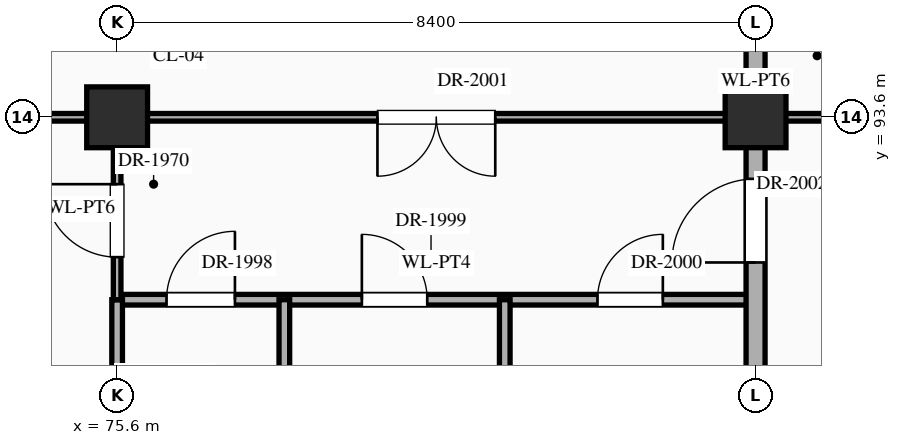
"""IFC4 building model, lengths in metres.
Left out: names, types, materials, properties, quantities, classifications, styles, units other than length and angle.
Written with IfcOpenShell. Run it as: python <this file> out.ifc"""

import sys

from ifc_helpers import new_model, si_unit, direction, frame, frame_2d, origin, origin_2d, place, context, subcontext, project, spatial, rectangle, extrude, element, fill, save


model = new_model("IFC4")
c1 = context("Model", 3, precision=1e-05, world=origin(), true_north=direction((0.0, 1.0)))
c2 = subcontext(c1, "Body", "Model", "MODEL_VIEW")
j1 = project(units=[si_unit("LENGTHUNIT", "METRE"), si_unit("PLANEANGLEUNIT", "RADIAN")], contexts=[c1])
p1 = place(None, origin())
s1 = spatial("IfcSite", under=j1, at=p1, CompositionType="ELEMENT")
p2 = place(p1, origin())
s2 = spatial("IfcBuilding", under=s1, at=p2, CompositionType="ELEMENT")
p3 = place(p2, frame((0.0, 0.0, 21.6)))
s3 = spatial("IfcBuildingStorey", under=s2, at=p3, CompositionType="ELEMENT", Elevation=21.6)
for number, where, z_axis, x_axis in (
    (1, (75.6, 93.6, 0.0), (0.0, 0.0, 1.0), (1.0, 0.0, 0.0)),
    (2, (84.0, 93.6, 0.0), (0.0, 0.0, 1.0), (1.0, 0.0, 0.0)),
):
    element("IfcColumn", number, at=place(p3, frame(where, z_axis=z_axis, x_axis=x_axis)), inside=s3, PredefinedType="COLUMN", context=c2, shape_type="SweptSolid", body=[
        extrude(rectangle(XDim=0.8, YDim=0.8, at=origin_2d()), origin(), (0.0, 0.0, 1.0), 4.5),
    ])
p4 = place(p3, frame((75.6, 91.2, 0.0), z_axis=(0.0, 0.0, 1.0), x_axis=(1.0, 0.0, 0.0)))
e3 = element("IfcWall", 3, at=p4, inside=s3, PredefinedType="STANDARD", context=c2, shape_type="SweptSolid", body=[
    extrude(rectangle(XDim=8.4, YDim=0.14, at=frame_2d((4.2, 0.0))), origin(), (0.0, 0.0, 1.0), 4.24),
])
p5 = place(p4, frame((0.65, 0.0, 0.0)))
e4 = element("IfcOpeningElement", 4, at=p5, cuts=e3, PredefinedType="OPENING", context=c2, shape_type="SweptSolid", body=[
    extrude(rectangle(XDim=0.9, YDim=2.15, at=frame_2d((0.45, 1.075))), frame((0.0, 0.082, 0.0), z_axis=(0.0, -1.0, 0.0), x_axis=(1.0, 0.0, 0.0)), (0.0, 0.0, 1.0), 0.164),
])
p6 = place(p4, frame((3.22, 0.0, 0.0)))
e5 = element("IfcOpeningElement", 5, at=p6, cuts=e3, PredefinedType="OPENING", context=c2, shape_type="SweptSolid", body=[
    extrude(rectangle(XDim=0.86, YDim=2.1, at=frame_2d((0.43, 1.05))), frame((0.0, 0.082, 0.0), z_axis=(0.0, -1.0, 0.0), x_axis=(1.0, 0.0, 0.0)), (0.0, 0.0, 1.0), 0.164),
])
p7 = place(p4, frame((6.32, 0.0, 0.0)))
e6 = element("IfcOpeningElement", 6, at=p7, cuts=e3, PredefinedType="OPENING", context=c2, shape_type="SweptSolid", body=[
    extrude(rectangle(XDim=0.86, YDim=2.1, at=frame_2d((0.43, 1.05))), frame((0.0, 0.082, 0.0), z_axis=(0.0, -1.0, 0.0), x_axis=(1.0, 0.0, 0.0)), (0.0, 0.0, 1.0), 0.164),
])
p8 = place(p3, frame((67.2, 93.6, 0.0), z_axis=(0.0, 0.0, 1.0), x_axis=(1.0, 0.0, 0.0)))
e7 = element("IfcWall", 7, at=p8, inside=s3, PredefinedType="STANDARD", context=c2, shape_type="SweptSolid", body=[
    extrude(rectangle(XDim=33.6, YDim=0.1, at=frame_2d((16.8, 0.0))), origin(), (0.0, 0.0, 1.0), 3.39),
])
p9 = place(p8, frame((3.425, 0.0, 0.0)))
e8 = element("IfcOpeningElement", 8, at=p9, cuts=e7, PredefinedType="OPENING", context=c2, shape_type="SweptSolid", body=[
    extrude(rectangle(XDim=1.55, YDim=2.35, at=frame_2d((0.775, 1.175))), frame((0.0, 0.062, 0.0), z_axis=(0.0, -1.0, 0.0), x_axis=(1.0, 0.0, 0.0)), (0.0, 0.0, 1.0), 0.124),
])
p10 = place(p8, frame((28.55, 0.0, 0.0)))
e9 = element("IfcOpeningElement", 9, at=p10, cuts=e7, PredefinedType="OPENING", context=c2, shape_type="SweptSolid", body=[
    extrude(rectangle(XDim=1.7, YDim=2.45, at=frame_2d((0.85, 1.225))), frame((0.0, 0.062, 0.0), z_axis=(0.0, -1.0, 0.0), x_axis=(1.0, 0.0, 0.0)), (0.0, 0.0, 1.0), 0.124),
])
p11 = place(p8, frame((11.825, 0.0, 0.0)))
e10 = element("IfcOpeningElement", 10, at=p11, cuts=e7, PredefinedType="OPENING", context=c2, shape_type="SweptSolid", body=[
    extrude(rectangle(XDim=1.55, YDim=2.35, at=frame_2d((0.775, 1.175))), frame((0.0, 0.062, 0.0), z_axis=(0.0, -1.0, 0.0), x_axis=(1.0, 0.0, 0.0)), (0.0, 0.0, 1.0), 0.124),
])
p12 = place(p8, frame((17.85, 0.0, 0.0)))
e11 = element("IfcOpeningElement", 11, at=p12, cuts=e7, PredefinedType="OPENING", context=c2, shape_type="SweptSolid", body=[
    extrude(rectangle(XDim=1.02, YDim=2.4, at=frame_2d((0.51, 1.2))), frame((0.0, 0.062, 0.0), z_axis=(0.0, -1.0, 0.0), x_axis=(1.0, 0.0, 0.0)), (0.0, 0.0, 1.0), 0.124),
])
p13 = place(p8, frame((20.47, 0.0, 0.0)))
e12 = element("IfcOpeningElement", 12, at=p13, cuts=e7, PredefinedType="OPENING", context=c2, shape_type="SweptSolid", body=[
    extrude(rectangle(XDim=1.06, YDim=2.4, at=frame_2d((0.53, 1.2))), frame((0.0, 0.062, 0.0), z_axis=(0.0, -1.0, 0.0), x_axis=(1.0, 0.0, 0.0)), (0.0, 0.0, 1.0), 0.124),
])
p14 = place(p8, frame((23.07, 0.0, 0.0)))
e13 = element("IfcOpeningElement", 13, at=p14, cuts=e7, PredefinedType="OPENING", context=c2, shape_type="SweptSolid", body=[
    extrude(rectangle(XDim=1.14, YDim=2.4, at=frame_2d((0.57, 1.2))), frame((0.0, 0.062, 0.0), z_axis=(0.0, -1.0, 0.0), x_axis=(1.0, 0.0, 0.0)), (0.0, 0.0, 1.0), 0.124),
])
p15 = place(p3, frame((75.6, 89.2, 0.0), z_axis=(0.0, 0.0, 1.0), x_axis=(0.0, 1.0, 0.0)))
e14 = element("IfcWall", 14, at=p15, inside=s3, PredefinedType="STANDARD", context=c2, shape_type="SweptSolid", body=[
    extrude(rectangle(XDim=2.0, YDim=0.14, at=frame_2d((1.0, 0.0))), origin(), (0.0, 0.0, 1.0), 3.49),
])
p16 = place(p3, frame((75.6, 91.2, 0.0), z_axis=(0.0, 0.0, 1.0), x_axis=(0.0, 1.0, 0.0)))
e15 = element("IfcWall", 15, at=p16, inside=s3, PredefinedType="STANDARD", context=c2, shape_type="SweptSolid", body=[
    extrude(rectangle(XDim=2.4, YDim=0.1, at=frame_2d((1.2, 0.0))), origin(), (0.0, 0.0, 1.0), 3.49),
])
p17 = place(p16, frame((0.56, 0.0, 0.0)))
e16 = element("IfcOpeningElement", 16, at=p17, cuts=e15, PredefinedType="OPENING", context=c2, shape_type="SweptSolid", body=[
    extrude(rectangle(XDim=0.96, YDim=2.2, at=frame_2d((0.48, 1.1))), frame((0.0, 0.062, 0.0), z_axis=(0.0, -1.0, 0.0), x_axis=(1.0, 0.0, 0.0)), (0.0, 0.0, 1.0), 0.124),
])
for number, where, z_axis, x_axis in (
    (17, (77.8, 86.4, 0.0), (0.0, 0.0, 1.0), (0.0, 1.0, 0.0)),
    (18, (80.7, 86.4, 0.0), (0.0, 0.0, 1.0), (0.0, 1.0, 0.0)),
):
    element("IfcWall", number, at=place(p3, frame(where, z_axis=z_axis, x_axis=x_axis)), inside=s3, PredefinedType="STANDARD", context=c2, shape_type="SweptSolid", body=[
        extrude(rectangle(XDim=4.8, YDim=0.14, at=frame_2d((2.4, 0.0))), origin(), (0.0, 0.0, 1.0), 4.24),
    ])
p18 = place(p3, frame((84.0, 79.24, 0.0), z_axis=(0.0, 0.0, 1.0), x_axis=(0.0, 1.0, 0.0)))
e19 = element("IfcWall", 19, at=p18, inside=s3, PredefinedType="STANDARD", context=c2, shape_type="SweptSolid", body=[
    extrude(rectangle(XDim=35.92, YDim=0.25, at=frame_2d((17.96, 0.0))), origin(), (0.0, 0.0, 1.0), 3.49),
])
p19 = place(p18, frame((22.72, 0.0, 0.0)))
e20 = element("IfcOpeningElement", 20, at=p19, cuts=e19, PredefinedType="OPENING", context=c2, shape_type="SweptSolid", body=[
    extrude(rectangle(XDim=1.6, YDim=2.3, at=frame_2d((0.8, 1.15))), frame((0.0, 0.137, 0.0), z_axis=(0.0, -1.0, 0.0), x_axis=(1.0, 0.0, 0.0)), (0.0, 0.0, 1.0), 0.274),
])
p20 = place(p18, frame((12.45, 0.0, 0.0)))
e21 = element("IfcOpeningElement", 21, at=p20, cuts=e19, PredefinedType="OPENING", context=c2, shape_type="SweptSolid", body=[
    extrude(rectangle(XDim=1.1, YDim=2.2, at=frame_2d((0.55, 1.1))), frame((0.0, 0.137, 0.0), z_axis=(0.0, -1.0, 0.0), x_axis=(1.0, 0.0, 0.0)), (0.0, 0.0, 1.0), 0.274),
])
p21 = place(p18, frame((15.245, 0.0, 0.0)))
e22 = element("IfcOpeningElement", 22, at=p21, cuts=e19, PredefinedType="OPENING", context=c2, shape_type="SweptSolid", body=[
    extrude(rectangle(XDim=0.95, YDim=2.15, at=frame_2d((0.475, 1.075))), frame((0.0, 0.137, 0.0), z_axis=(0.0, -1.0, 0.0), x_axis=(1.0, 0.0, 0.0)), (0.0, 0.0, 1.0), 0.274),
])
p22 = place(p18, frame((25.9, 0.0, 0.0)))
e23 = element("IfcOpeningElement", 23, at=p22, cuts=e19, PredefinedType="OPENING", context=c2, shape_type="SweptSolid", body=[
    extrude(rectangle(XDim=1.8, YDim=2.35, at=frame_2d((0.9, 1.175))), frame((0.0, 0.137, 0.0), z_axis=(0.0, -1.0, 0.0), x_axis=(1.0, 0.0, 0.0)), (0.0, 0.0, 1.0), 0.274),
])
p23 = place(p18, frame((29.62, 0.0, 0.0)))
e24 = element("IfcOpeningElement", 24, at=p23, cuts=e19, PredefinedType="OPENING", context=c2, shape_type="SweptSolid", body=[
    extrude(rectangle(XDim=1.0, YDim=2.2, at=frame_2d((0.5, 1.1))), frame((0.0, 0.137, 0.0), z_axis=(0.0, -1.0, 0.0), x_axis=(1.0, 0.0, 0.0)), (0.0, 0.0, 1.0), 0.274),
])
p24 = place(p18, frame((5.3, 0.0, 0.0)))
e25 = element("IfcOpeningElement", 25, at=p24, cuts=e19, PredefinedType="OPENING", context=c2, shape_type="SweptSolid", body=[
    extrude(rectangle(XDim=1.0, YDim=2.2, at=frame_2d((0.5, 1.1))), frame((0.0, 0.137, 0.0), z_axis=(0.0, -1.0, 0.0), x_axis=(1.0, 0.0, 0.0)), (0.0, 0.0, 1.0), 0.274),
])
p25 = place(p17, origin())
e26 = element("IfcDoor", 26, at=p25, inside=s3, OperationType="SINGLE_SWING_RIGHT", PredefinedType="DOOR", context=c2, shape_type="SweptSolid", body=[
    extrude(rectangle(XDim=0.96, YDim=2.2, at=frame_2d((0.48, 1.1))), frame((0.0, 0.025, 0.0), z_axis=(0.0, -1.0, 0.0), x_axis=(1.0, 0.0, 0.0)), (0.0, 0.0, 1.0), 0.05),
])
fill(e16, e26)
p26 = place(p5, origin())
e27 = element("IfcDoor", 27, at=p26, inside=s3, OperationType="SINGLE_SWING_RIGHT", PredefinedType="DOOR", context=c2, shape_type="SweptSolid", body=[
    extrude(rectangle(XDim=0.9, YDim=2.15, at=frame_2d((0.45, 1.075))), frame((0.0, 0.025, 0.0), z_axis=(0.0, -1.0, 0.0), x_axis=(1.0, 0.0, 0.0)), (0.0, 0.0, 1.0), 0.05),
])
fill(e4, e27)
p27 = place(p6, origin())
e28 = element("IfcDoor", 28, at=p27, inside=s3, OperationType="SINGLE_SWING_LEFT", PredefinedType="DOOR", context=c2, shape_type="SweptSolid", body=[
    extrude(rectangle(XDim=0.86, YDim=2.1, at=frame_2d((0.43, 1.05))), frame((0.0, 0.025, 0.0), z_axis=(0.0, -1.0, 0.0), x_axis=(1.0, 0.0, 0.0)), (0.0, 0.0, 1.0), 0.05),
])
fill(e5, e28)
p28 = place(p7, origin())
e29 = element("IfcDoor", 29, at=p28, inside=s3, OperationType="SINGLE_SWING_RIGHT", PredefinedType="DOOR", context=c2, shape_type="SweptSolid", body=[
    extrude(rectangle(XDim=0.86, YDim=2.1, at=frame_2d((0.43, 1.05))), frame((0.0, 0.025, 0.0), z_axis=(0.0, -1.0, 0.0), x_axis=(1.0, 0.0, 0.0)), (0.0, 0.0, 1.0), 0.05),
])
fill(e6, e29)
p29 = place(p11, frame((1.55, 0.0, 0.0), z_axis=(0.0, 0.0, 1.0), x_axis=(-1.0, 0.0, 0.0)))
e30 = element("IfcDoor", 30, at=p29, inside=s3, OperationType="DOUBLE_DOOR_SINGLE_SWING", PredefinedType="DOOR", context=c2, shape_type="SweptSolid", body=[
    extrude(rectangle(XDim=1.55, YDim=2.35, at=frame_2d((0.775, 1.175))), frame((0.0, 0.025, 0.0), z_axis=(0.0, -1.0, 0.0), x_axis=(1.0, 0.0, 0.0)), (0.0, 0.0, 1.0), 0.05),
])
fill(e10, e30)
p30 = place(p20, origin())
e31 = element("IfcDoor", 31, at=p30, inside=s3, OperationType="SINGLE_SWING_LEFT", PredefinedType="DOOR", context=c2, shape_type="SweptSolid", body=[
    extrude(rectangle(XDim=1.1, YDim=2.2, at=frame_2d((0.55, 1.1))), frame((0.0, 0.025, 0.0), z_axis=(0.0, -1.0, 0.0), x_axis=(1.0, 0.0, 0.0)), (0.0, 0.0, 1.0), 0.05),
])
fill(e21, e31)
save(model, sys.argv[1])
